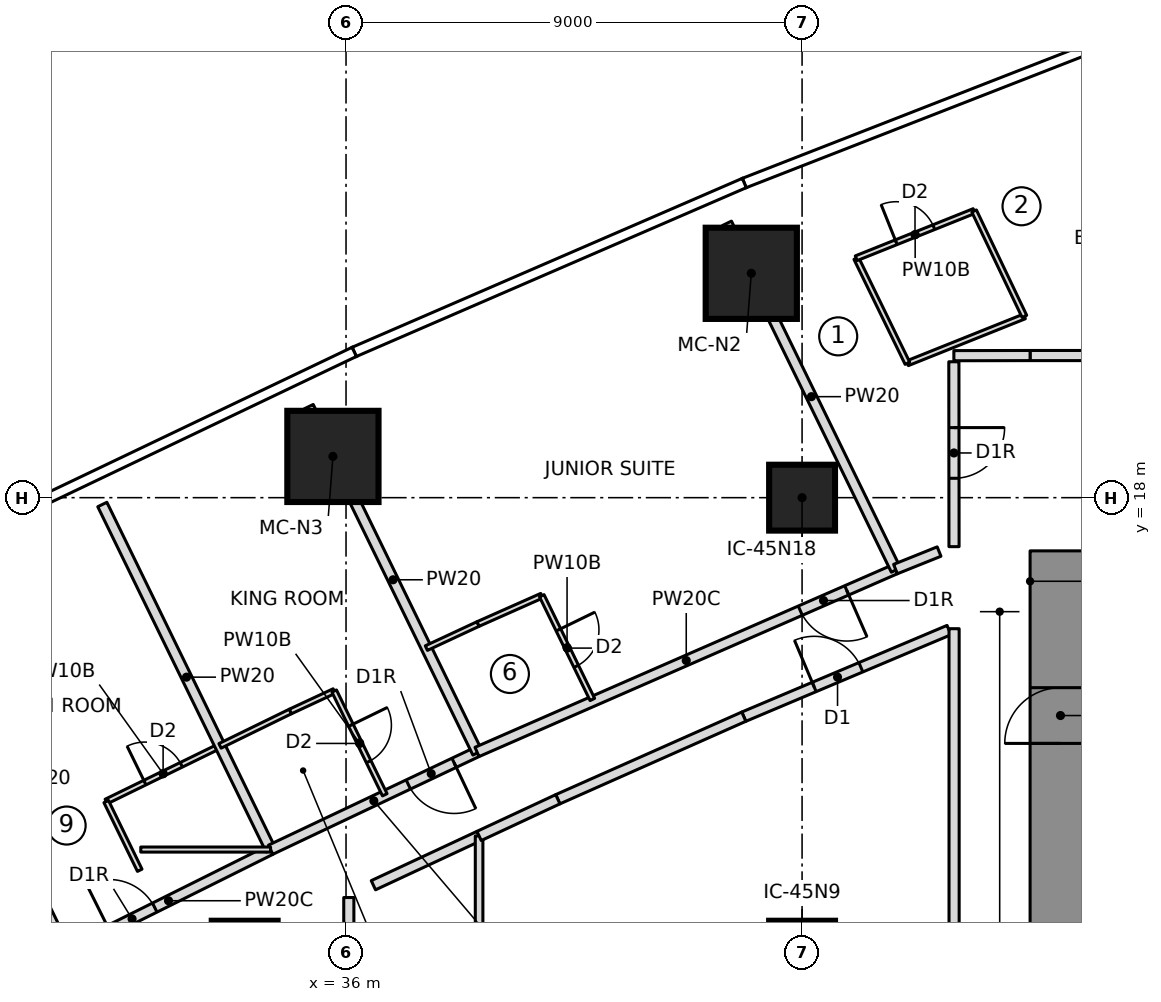
"""IFC4 building model, lengths in metres.
Left out: names, types, materials, properties, quantities, classifications, styles, units other than length and angle.
Written with IfcOpenShell. Run it as: python <this file> out.ifc"""

import sys

from ifc_helpers import new_model, si_unit, direction, frame, frame_2d, origin, origin_2d, place, context, subcontext, project, spatial, rectangle, extrude, element, fill, save


model = new_model("IFC4")
c1 = context("Model", 3, precision=1e-05, world=origin(), true_north=direction((0.0, 1.0)))
c2 = subcontext(c1, "Body", "Model", "MODEL_VIEW")
j1 = project(units=[si_unit("LENGTHUNIT", "METRE"), si_unit("PLANEANGLEUNIT", "RADIAN")], contexts=[c1])
p1 = place(None, origin())
s1 = spatial("IfcSite", under=j1, at=p1, CompositionType="ELEMENT")
p2 = place(p1, origin())
s2 = spatial("IfcBuilding", under=s1, at=p2, CompositionType="ELEMENT")
p3 = place(p2, frame((0.0, 0.0, 39.6)))
s3 = spatial("IfcBuildingStorey", under=s2, at=p3, CompositionType="ELEMENT", Elevation=39.6)
p4 = place(p3, frame((50.1, 6.65, 0.0), z_axis=(0.0, 0.0, 1.0), x_axis=(0.0, 1.0, 0.0)))
e1 = element("IfcWall", 1, at=p4, inside=s3, PredefinedType="SHEAR", context=c2, shape_type="SweptSolid", body=[
    extrude(rectangle(XDim=10.3, YDim=1.2, at=frame_2d((5.15, 0.0))), origin(), (0.0, 0.0, 1.0), 3.55),
])
p5 = place(p4, frame((6.5, 0.0, 0.0)))
e2 = element("IfcOpeningElement", 2, at=p5, cuts=e1, PredefinedType="OPENING", context=c2, shape_type="SweptSolid", body=[
    extrude(rectangle(XDim=1.1, YDim=2.1, at=frame_2d((0.55, 1.05))), frame((0.0, 0.61, 0.0), z_axis=(0.0, -1.0, 0.0), x_axis=(1.0, 0.0, 0.0)), (0.0, 0.0, 1.0), 1.22),
])
for number, where, z_axis, x_axis in (
    (3, (43.998, 22.428, 0.0), (0.0, 0.0, 1.0), (1.0, 0.0, 0.0)),
    (4, (35.741, 18.814, 0.0), (0.0, 0.0, 1.0), (1.0, 0.0, 0.0)),
):
    element("IfcColumn", number, at=place(p3, frame(where, z_axis=z_axis, x_axis=x_axis)), inside=s3, PredefinedType="COLUMN", context=c2, shape_type="SweptSolid", body=[
        extrude(rectangle(XDim=1.8, YDim=1.8, at=origin_2d()), origin(), (0.0, 0.0, 1.0), 3.55),
    ])
for number, where, z_axis, x_axis in (
    (5, (34.0, 9.0, 0.0), (0.0, 0.0, 1.0), (1.0, 0.0, 0.0)),
    (6, (45.0, 9.0, 0.0), (0.0, 0.0, 1.0), (1.0, 0.0, 0.0)),
    (7, (45.0, 18.0, 0.0), (0.0, 0.0, 1.0), (1.0, 0.0, 0.0)),
):
    element("IfcColumn", number, at=place(p3, frame(where, z_axis=z_axis, x_axis=x_axis)), inside=s3, PredefinedType="COLUMN", context=c2, shape_type="SweptSolid", body=[
        extrude(rectangle(XDim=1.3, YDim=1.3, at=origin_2d()), origin(), (0.0, 0.0, 1.0), 3.55),
    ])
p6 = place(p3, frame((30.489, 9.022, 0.0), z_axis=(0.0, 0.0, 1.0), x_axis=(-0.43822365664, 0.898865967072, 0.0)))
e8 = element("IfcWall", 8, at=p6, inside=s3, PredefinedType="PARTITIONING", context=c2, shape_type="SweptSolid", body=[
    extrude(rectangle(XDim=7.601, YDim=0.2, at=frame_2d((3.801, 0.0))), origin(), (0.0, 0.0, 1.0), 3.25),
])
p7 = place(p3, frame((30.48, 9.04, 0.0), z_axis=(0.0, 0.0, 1.0), x_axis=(0.894989913054, 0.446086376761, 0.0)))
e9 = element("IfcWall", 9, at=p7, inside=s3, PredefinedType="PARTITIONING", context=c2, shape_type="SweptSolid", body=[
    extrude(rectangle(XDim=4.506, YDim=0.2, at=frame_2d((2.253, 0.0))), origin(), (0.0, 0.0, 1.0), 3.25),
])
p8 = place(p7, frame((0.95, 0.0, 0.0)))
e10 = element("IfcOpeningElement", 10, at=p8, cuts=e9, PredefinedType="OPENING", context=c2, shape_type="SweptSolid", body=[
    extrude(rectangle(XDim=1.0, YDim=2.1, at=frame_2d((0.5, 1.05))), frame((0.0, 0.11, 0.0), z_axis=(0.0, -1.0, 0.0), x_axis=(1.0, 0.0, 0.0)), (0.0, 0.0, 1.0), 0.22),
])
p9 = place(p3, frame((31.267, 12.003, 0.0), z_axis=(0.0, 0.0, 1.0), x_axis=(0.89845285455, 0.439070003702, 0.0)))
e11 = element("IfcWall", 11, at=p9, inside=s3, PredefinedType="PARTITIONING", context=c2, shape_type="SweptSolid", body=[
    extrude(rectangle(XDim=2.5, YDim=0.1, at=frame_2d((1.25, 0.0))), origin(), (0.0, 0.0, 1.0), 3.25),
])
p10 = place(p9, frame((0.85, 0.0, 0.0)))
e12 = element("IfcOpeningElement", 12, at=p10, cuts=e11, PredefinedType="OPENING", context=c2, shape_type="SweptSolid", body=[
    extrude(rectangle(XDim=0.8, YDim=2.1, at=frame_2d((0.4, 1.05))), frame((0.0, 0.06, 0.0), z_axis=(0.0, -1.0, 0.0), x_axis=(1.0, 0.0, 0.0)), (0.0, 0.0, 1.0), 0.12),
])
p11 = place(p3, frame((31.929, 10.646, 0.0), z_axis=(0.0, 0.0, 1.0), x_axis=(-0.438136931394, 0.898908243008, 0.0)))
e13 = element("IfcWall", 13, at=p11, inside=s3, PredefinedType="PARTITIONING", context=c2, shape_type="SweptSolid", body=[
    extrude(rectangle(XDim=1.51, YDim=0.1, at=frame_2d((0.755, 0.0))), origin(), (0.0, 0.0, 1.0), 3.25),
])
p12 = place(p3, frame((34.513, 11.05, 0.0), z_axis=(0.0, 0.0, 1.0), x_axis=(-0.438187612283, 0.898883538865, 0.0)))
e14 = element("IfcWall", 14, at=p12, inside=s3, PredefinedType="PARTITIONING", context=c2, shape_type="SweptSolid", body=[
    extrude(rectangle(XDim=7.582, YDim=0.2, at=frame_2d((3.791, 0.0))), origin(), (0.0, 0.0, 1.0), 3.25),
])
p13 = place(p3, frame((38.585, 12.981, 0.0), z_axis=(0.0, 0.0, 1.0), x_axis=(-0.903706948966, -0.428151550727, 0.0)))
e15 = element("IfcWall", 15, at=p13, inside=s3, PredefinedType="PARTITIONING", context=c2, shape_type="SweptSolid", body=[
    extrude(rectangle(XDim=4.506, YDim=0.2, at=frame_2d((2.253, 0.0))), origin(), (0.0, 0.0, 1.0), 3.25),
])
p14 = place(p13, frame((0.5, 0.0, 0.0)))
e16 = element("IfcOpeningElement", 16, at=p14, cuts=e15, PredefinedType="OPENING", context=c2, shape_type="SweptSolid", body=[
    extrude(rectangle(XDim=1.0, YDim=2.1, at=frame_2d((0.5, 1.05))), frame((0.0, 0.11, 0.0), z_axis=(0.0, -1.0, 0.0), x_axis=(1.0, 0.0, 0.0)), (0.0, 0.0, 1.0), 0.22),
])
p15 = place(p3, frame((33.513, 13.101, 0.0), z_axis=(0.0, 0.0, 1.0), x_axis=(0.898338680123, 0.439303557685, 0.0)))
e17 = element("IfcWall", 17, at=p15, inside=s3, PredefinedType="PARTITIONING", context=c2, shape_type="SweptSolid", body=[
    extrude(rectangle(XDim=1.547, YDim=0.1, at=frame_2d((0.773, 0.0))), origin(), (0.0, 0.0, 1.0), 3.25),
])
p16 = place(p3, frame((34.903, 13.781, 0.0), z_axis=(0.0, 0.0, 1.0), x_axis=(0.906477304063, 0.422254540791, 0.0)))
e18 = element("IfcWall", 18, at=p16, inside=s3, PredefinedType="PARTITIONING", context=c2, shape_type="SweptSolid", body=[
    extrude(rectangle(XDim=0.953, YDim=0.1, at=frame_2d((0.477, 0.0))), origin(), (0.0, 0.0, 1.0), 3.25),
])
p17 = place(p3, frame((35.767, 14.183, 0.0), z_axis=(0.0, 0.0, 1.0), x_axis=(0.438229314017, -0.898863208912, 0.0)))
e19 = element("IfcWall", 19, at=p17, inside=s3, PredefinedType="PARTITIONING", context=c2, shape_type="SweptSolid", body=[
    extrude(rectangle(XDim=2.277, YDim=0.1, at=frame_2d((1.139, 0.0))), origin(), (0.0, 0.0, 1.0), 3.25),
])
p18 = place(p17, frame((0.75, 0.0, 0.0)))
e20 = element("IfcOpeningElement", 20, at=p18, cuts=e19, PredefinedType="OPENING", context=c2, shape_type="SweptSolid", body=[
    extrude(rectangle(XDim=0.8, YDim=2.1, at=frame_2d((0.4, 1.05))), frame((0.0, 0.06, 0.0), z_axis=(0.0, -1.0, 0.0), x_axis=(1.0, 0.0, 0.0)), (0.0, 0.0, 1.0), 0.12),
])
p19 = place(p3, frame((38.594, 12.963, 0.0), z_axis=(0.0, 0.0, 1.0), x_axis=(-0.438197705697, 0.898878618459, 0.0)))
e21 = element("IfcWall", 21, at=p19, inside=s3, PredefinedType="PARTITIONING", context=c2, shape_type="SweptSolid", body=[
    extrude(rectangle(XDim=7.601, YDim=0.2, at=frame_2d((3.801, 0.0))), origin(), (0.0, 0.0, 1.0), 3.25),
])
p20 = place(p3, frame((46.844, 16.591, 0.0), z_axis=(0.0, 0.0, 1.0), x_axis=(-0.916303988169, -0.400483459415, 0.0)))
e22 = element("IfcWall", 22, at=p20, inside=s3, PredefinedType="PARTITIONING", context=c2, shape_type="SweptSolid", body=[
    extrude(rectangle(XDim=9.013, YDim=0.2, at=frame_2d((4.507, 0.0))), origin(), (0.0, 0.0, 1.0), 3.25),
])
p21 = place(p20, frame((1.05, 0.0, 0.0)))
e23 = element("IfcOpeningElement", 23, at=p21, cuts=e22, PredefinedType="OPENING", context=c2, shape_type="SweptSolid", body=[
    extrude(rectangle(XDim=1.0, YDim=2.1, at=frame_2d((0.5, 1.05))), frame((0.0, 0.11, 0.0), z_axis=(0.0, -1.0, 0.0), x_axis=(1.0, 0.0, 0.0)), (0.0, 0.0, 1.0), 0.22),
])
p22 = place(p3, frame((37.586, 15.031, 0.0), z_axis=(0.0, 0.0, 1.0), x_axis=(0.90632717857, 0.422576673972, 0.0)))
e24 = element("IfcWall", 24, at=p22, inside=s3, PredefinedType="PARTITIONING", context=c2, shape_type="SweptSolid", body=[
    extrude(rectangle(XDim=1.125, YDim=0.1, at=frame_2d((0.563, 0.0))), origin(), (0.0, 0.0, 1.0), 3.25),
])
p23 = place(p3, frame((38.606, 15.507, 0.0), z_axis=(0.0, 0.0, 1.0), x_axis=(0.913972512123, 0.405776104625, 0.0)))
e25 = element("IfcWall", 25, at=p23, inside=s3, PredefinedType="PARTITIONING", context=c2, shape_type="SweptSolid", body=[
    extrude(rectangle(XDim=1.375, YDim=0.1, at=frame_2d((0.688, 0.0))), origin(), (0.0, 0.0, 1.0), 3.25),
])
p24 = place(p3, frame((39.863, 16.065, 0.0), z_axis=(0.0, 0.0, 1.0), x_axis=(0.438233629628, -0.898861104878, 0.0)))
e26 = element("IfcWall", 26, at=p24, inside=s3, PredefinedType="PARTITIONING", context=c2, shape_type="SweptSolid", body=[
    extrude(rectangle(XDim=2.279, YDim=0.1, at=frame_2d((1.139, 0.0))), origin(), (0.0, 0.0, 1.0), 3.25),
])
p25 = place(p24, frame((0.75, 0.0, 0.0)))
e27 = element("IfcOpeningElement", 27, at=p25, cuts=e26, PredefinedType="OPENING", context=c2, shape_type="SweptSolid", body=[
    extrude(rectangle(XDim=0.8, YDim=2.1, at=frame_2d((0.4, 1.05))), frame((0.0, 0.06, 0.0), z_axis=(0.0, -1.0, 0.0), x_axis=(1.0, 0.0, 0.0)), (0.0, 0.0, 1.0), 0.12),
])
p26 = place(p3, frame((46.852, 16.573, 0.0), z_axis=(0.0, 0.0, 1.0), x_axis=(-0.438196739796, 0.898879089328, 0.0)))
e28 = element("IfcWall", 28, at=p26, inside=s3, PredefinedType="PARTITIONING", context=c2, shape_type="SweptSolid", body=[
    extrude(rectangle(XDim=7.611, YDim=0.2, at=frame_2d((3.806, 0.0))), origin(), (0.0, 0.0, 1.0), 3.25),
])
p27 = place(p3, frame((49.388, 21.577, 0.0), z_axis=(0.0, 0.0, 1.0), x_axis=(-0.928266690687, -0.371915247014, 0.0)))
e29 = element("IfcWall", 29, at=p27, inside=s3, PredefinedType="PARTITIONING", context=c2, shape_type="SweptSolid", body=[
    extrude(rectangle(XDim=2.487, YDim=0.1, at=frame_2d((1.244, 0.0))), origin(), (0.0, 0.0, 1.0), 3.25),
])
p28 = place(p3, frame((47.079, 20.652, 0.0), z_axis=(0.0, 0.0, 1.0), x_axis=(-0.438171240168, 0.898891519756, 0.0)))
e30 = element("IfcWall", 30, at=p28, inside=s3, PredefinedType="PARTITIONING", context=c2, shape_type="SweptSolid", body=[
    extrude(rectangle(XDim=2.306, YDim=0.1, at=frame_2d((1.153, 0.0))), origin(), (0.0, 0.0, 1.0), 3.25),
])
p29 = place(p3, frame((46.069, 22.725, 0.0), z_axis=(0.0, 0.0, 1.0), x_axis=(0.928288495333, 0.371860819975, 0.0)))
e31 = element("IfcWall", 31, at=p29, inside=s3, PredefinedType="PARTITIONING", context=c2, shape_type="SweptSolid", body=[
    extrude(rectangle(XDim=2.507, YDim=0.1, at=frame_2d((1.253, 0.0))), origin(), (0.0, 0.0, 1.0), 3.25),
])
p30 = place(p29, frame((0.85, 0.0, 0.0)))
e32 = element("IfcOpeningElement", 32, at=p30, cuts=e31, PredefinedType="OPENING", context=c2, shape_type="SweptSolid", body=[
    extrude(rectangle(XDim=0.8, YDim=2.1, at=frame_2d((0.4, 1.05))), frame((0.0, 0.06, 0.0), z_axis=(0.0, -1.0, 0.0), x_axis=(1.0, 0.0, 0.0)), (0.0, 0.0, 1.0), 0.12),
])
p31 = place(p3, frame((36.54, 10.351, 0.0), z_axis=(0.0, 0.0, 1.0), x_axis=(0.906372737018, 0.422478948103, 0.0)))
e33 = element("IfcWall", 33, at=p31, inside=s3, PredefinedType="PARTITIONING", context=c2, shape_type="SweptSolid", body=[
    extrude(rectangle(XDim=2.302, YDim=0.2, at=frame_2d((1.151, 0.0))), origin(), (0.0, 0.0, 1.0), 3.25),
])
p32 = place(p3, frame((38.626, -11.323, 0.0), z_axis=(0.0, 0.0, 1.0), x_axis=(0.0, 1.0, 0.0)))
e34 = element("IfcWall", 34, at=p32, inside=s3, PredefinedType="PARTITIONING", context=c2, shape_type="SweptSolid", body=[
    extrude(rectangle(XDim=22.647, YDim=0.15, at=frame_2d((11.323, 0.0))), origin(), (0.0, 0.0, 1.0), 3.25),
])
p33 = place(p3, frame((43.85, 13.677, 0.0), z_axis=(0.0, 0.0, 1.0), x_axis=(0.921265924084, 0.388933281068, 0.0)))
e35 = element("IfcWall", 35, at=p33, inside=s3, PredefinedType="PARTITIONING", context=c2, shape_type="SweptSolid", body=[
    extrude(rectangle(XDim=4.396, YDim=0.2, at=frame_2d((2.198, 0.0))), origin(), (0.0, 0.0, 1.0), 3.25),
])
p34 = place(p33, frame((1.508, 0.0, 0.0)))
e36 = element("IfcOpeningElement", 36, at=p34, cuts=e35, PredefinedType="OPENING", context=c2, shape_type="SweptSolid", body=[
    extrude(rectangle(XDim=1.0, YDim=2.1, at=frame_2d((0.5, 1.05))), frame((0.0, 0.11, 0.0), z_axis=(0.0, -1.0, 0.0), x_axis=(1.0, 0.0, 0.0)), (0.0, 0.0, 1.0), 0.22),
])
p35 = place(p3, frame((40.18, 12.048, 0.0), z_axis=(0.0, 0.0, 1.0), x_axis=(0.913986953061, 0.405743576209, 0.0)))
e37 = element("IfcWall", 37, at=p35, inside=s3, PredefinedType="PARTITIONING", context=c2, shape_type="SweptSolid", body=[
    extrude(rectangle(XDim=4.016, YDim=0.2, at=frame_2d((2.008, 0.0))), origin(), (0.0, 0.0, 1.0), 3.25),
])
p36 = place(p3, frame((38.626, 11.323, 0.0), z_axis=(0.0, 0.0, 1.0), x_axis=(0.906314095157, 0.422604733668, 0.0)))
e38 = element("IfcWall", 38, at=p36, inside=s3, PredefinedType="PARTITIONING", context=c2, shape_type="SweptSolid", body=[
    extrude(rectangle(XDim=1.714, YDim=0.2, at=frame_2d((0.857, 0.0))), origin(), (0.0, 0.0, 1.0), 3.25),
])
p37 = place(p3, frame((54.597, 20.805, 0.0), z_axis=(0.0, 0.0, 1.0), x_axis=(-1.0, 0.0, 0.0)))
e39 = element("IfcWall", 39, at=p37, inside=s3, PredefinedType="PARTITIONING", context=c2, shape_type="SweptSolid", body=[
    extrude(rectangle(XDim=5.097, YDim=0.2, at=frame_2d((2.548, 0.0))), origin(), (0.0, 0.0, 1.0), 3.25),
])
p38 = place(p37, frame((2.048, 0.0, 0.0)))
e40 = element("IfcOpeningElement", 40, at=p38, cuts=e39, PredefinedType="OPENING", context=c2, shape_type="SweptSolid", body=[
    extrude(rectangle(XDim=1.5, YDim=2.1, at=frame_2d((0.75, 1.05))), frame((0.0, 0.11, 0.0), z_axis=(0.0, -1.0, 0.0), x_axis=(1.0, 0.0, 0.0)), (0.0, 0.0, 1.0), 0.22),
])
p39 = place(p3, frame((34.51, 11.055, 0.0), z_axis=(0.0, 0.0, 1.0), x_axis=(-1.0, 0.0, 0.0)))
e41 = element("IfcWall", 41, at=p39, inside=s3, PredefinedType="PARTITIONING", context=c2, shape_type="SweptSolid", body=[
    extrude(rectangle(XDim=2.562, YDim=0.1, at=frame_2d((1.281, 0.0))), origin(), (0.0, 0.0, 1.0), 3.25),
])
p40 = place(p3, frame((48.396, 23.657, 0.0), z_axis=(0.0, 0.0, 1.0), x_axis=(0.4306119303, -0.902537182327, 0.0)))
e42 = element("IfcWall", 42, at=p40, inside=s3, PredefinedType="PARTITIONING", context=c2, shape_type="SweptSolid", body=[
    extrude(rectangle(XDim=2.305, YDim=0.1, at=frame_2d((1.152, 0.0))), origin(), (0.0, 0.0, 1.0), 3.25),
])
p41 = place(p3, frame((47.704, 16.936, 0.0), z_axis=(0.0, 0.0, 1.0), x_axis=(-0.927985537407, -0.372616213232, 0.0)))
e43 = element("IfcWall", 43, at=p41, inside=s3, PredefinedType="PARTITIONING", context=c2, shape_type="SweptSolid", body=[
    extrude(rectangle(XDim=0.927, YDim=0.2, at=frame_2d((0.463, 0.0))), origin(), (0.0, 0.0, 1.0), 3.25),
])
p42 = place(p3, frame((36.055, 6.949, 0.0), z_axis=(0.0, 0.0, 1.0), x_axis=(0.0, 1.0, 0.0)))
e44 = element("IfcWall", 44, at=p42, inside=s3, PredefinedType="PARTITIONING", context=c2, shape_type="SweptSolid", body=[
    extrude(rectangle(XDim=3.159, YDim=0.2, at=frame_2d((1.58, 0.0))), origin(), (0.0, 0.0, 1.0), 3.25),
])
p43 = place(p3, frame((48.0, 15.414, 0.0), z_axis=(0.0, 0.0, 1.0), x_axis=(0.0, -1.0, 0.0)))
e45 = element("IfcWall", 45, at=p43, inside=s3, PredefinedType="PARTITIONING", context=c2, shape_type="SweptSolid", body=[
    extrude(rectangle(XDim=30.828, YDim=0.2, at=frame_2d((15.414, 0.0))), origin(), (0.0, 0.0, 1.0), 3.25),
])
p44 = place(p3, frame((49.5, 20.805, 0.0), z_axis=(0.0, 0.0, 1.0), x_axis=(-0.999998683182, -0.001622847587, 0.0)))
e46 = element("IfcWall", 46, at=p44, inside=s3, PredefinedType="PARTITIONING", context=c2, shape_type="SweptSolid", body=[
    extrude(rectangle(XDim=1.504, YDim=0.2, at=frame_2d((0.752, 0.0))), origin(), (0.0, 0.0, 1.0), 3.25),
])
p45 = place(p3, frame((47.996, 20.682, 0.0), z_axis=(0.0, 0.0, 1.0), x_axis=(0.000869739418, -0.999999621777, 0.0)))
e47 = element("IfcWall", 47, at=p45, inside=s3, PredefinedType="PARTITIONING", context=c2, shape_type="SweptSolid", body=[
    extrude(rectangle(XDim=3.649, YDim=0.2, at=frame_2d((1.825, 0.0))), origin(), (0.0, 0.0, 1.0), 3.25),
])
p46 = place(p45, frame((1.3, 0.0, 0.0)))
e48 = element("IfcOpeningElement", 48, at=p46, cuts=e47, PredefinedType="OPENING", context=c2, shape_type="SweptSolid", body=[
    extrude(rectangle(XDim=1.0, YDim=2.1, at=frame_2d((0.5, 1.05))), frame((0.0, 0.11, 0.0), z_axis=(0.0, -1.0, 0.0), x_axis=(1.0, 0.0, 0.0)), (0.0, 0.0, 1.0), 0.22),
])
p47 = place(p10, origin())
e49 = element("IfcDoor", 49, at=p47, inside=s3, OperationType="SINGLE_SWING_LEFT", PredefinedType="DOOR", context=c2, shape_type="SweptSolid", body=[
    extrude(rectangle(XDim=0.8, YDim=2.1, at=frame_2d((0.4, 1.05))), frame((0.0, 0.025, 0.0), z_axis=(0.0, -1.0, 0.0), x_axis=(1.0, 0.0, 0.0)), (0.0, 0.0, 1.0), 0.05),
])
fill(e12, e49)
p48 = place(p8, origin())
e50 = element("IfcDoor", 50, at=p48, inside=s3, OperationType="SINGLE_SWING_RIGHT", PredefinedType="DOOR", context=c2, shape_type="SweptSolid", body=[
    extrude(rectangle(XDim=1.0, YDim=2.1, at=frame_2d((0.5, 1.05))), frame((0.0, 0.025, 0.0), z_axis=(0.0, -1.0, 0.0), x_axis=(1.0, 0.0, 0.0)), (0.0, 0.0, 1.0), 0.05),
])
fill(e10, e50)
p49 = place(p18, origin())
e51 = element("IfcDoor", 51, at=p49, inside=s3, OperationType="SINGLE_SWING_LEFT", PredefinedType="DOOR", context=c2, shape_type="SweptSolid", body=[
    extrude(rectangle(XDim=0.8, YDim=2.1, at=frame_2d((0.4, 1.05))), frame((0.0, 0.025, 0.0), z_axis=(0.0, -1.0, 0.0), x_axis=(1.0, 0.0, 0.0)), (0.0, 0.0, 1.0), 0.05),
])
fill(e20, e51)
p50 = place(p14, origin())
e52 = element("IfcDoor", 52, at=p50, inside=s3, OperationType="SINGLE_SWING_RIGHT", PredefinedType="DOOR", context=c2, shape_type="SweptSolid", body=[
    extrude(rectangle(XDim=1.0, YDim=2.1, at=frame_2d((0.5, 1.05))), frame((0.0, 0.025, 0.0), z_axis=(0.0, -1.0, 0.0), x_axis=(1.0, 0.0, 0.0)), (0.0, 0.0, 1.0), 0.05),
])
fill(e16, e52)
p51 = place(p25, origin())
e53 = element("IfcDoor", 53, at=p51, inside=s3, OperationType="SINGLE_SWING_LEFT", PredefinedType="DOOR", context=c2, shape_type="SweptSolid", body=[
    extrude(rectangle(XDim=0.8, YDim=2.1, at=frame_2d((0.4, 1.05))), frame((0.0, 0.025, 0.0), z_axis=(0.0, -1.0, 0.0), x_axis=(1.0, 0.0, 0.0)), (0.0, 0.0, 1.0), 0.05),
])
fill(e27, e53)
p52 = place(p21, origin())
e54 = element("IfcDoor", 54, at=p52, inside=s3, OperationType="SINGLE_SWING_RIGHT", PredefinedType="DOOR", context=c2, shape_type="SweptSolid", body=[
    extrude(rectangle(XDim=1.0, YDim=2.1, at=frame_2d((0.5, 1.05))), frame((0.0, 0.025, 0.0), z_axis=(0.0, -1.0, 0.0), x_axis=(1.0, 0.0, 0.0)), (0.0, 0.0, 1.0), 0.05),
])
fill(e23, e54)
p53 = place(p30, origin())
e55 = element("IfcDoor", 55, at=p53, inside=s3, OperationType="SINGLE_SWING_LEFT", PredefinedType="DOOR", context=c2, shape_type="SweptSolid", body=[
    extrude(rectangle(XDim=0.8, YDim=2.1, at=frame_2d((0.4, 1.05))), frame((0.0, 0.025, 0.0), z_axis=(0.0, -1.0, 0.0), x_axis=(1.0, 0.0, 0.0)), (0.0, 0.0, 1.0), 0.05),
])
fill(e32, e55)
p54 = place(p34, origin())
e56 = element("IfcDoor", 56, at=p54, inside=s3, OperationType="SINGLE_SWING_LEFT", PredefinedType="DOOR", context=c2, shape_type="SweptSolid", body=[
    extrude(rectangle(XDim=1.0, YDim=2.1, at=frame_2d((0.5, 1.05))), frame((0.0, 0.025, 0.0), z_axis=(0.0, -1.0, 0.0), x_axis=(1.0, 0.0, 0.0)), (0.0, 0.0, 1.0), 0.05),
])
fill(e36, e56)
p55 = place(p46, origin())
e57 = element("IfcDoor", 57, at=p55, inside=s3, OperationType="SINGLE_SWING_RIGHT", PredefinedType="DOOR", context=c2, shape_type="SweptSolid", body=[
    extrude(rectangle(XDim=1.0, YDim=2.1, at=frame_2d((0.5, 1.05))), frame((0.0, 0.025, 0.0), z_axis=(0.0, -1.0, 0.0), x_axis=(1.0, 0.0, 0.0)), (0.0, 0.0, 1.0), 0.05),
])
fill(e48, e57)
p56 = place(p5, origin())
e58 = element("IfcDoor", 58, at=p56, inside=s3, OperationType="SINGLE_SWING_RIGHT", PredefinedType="DOOR", context=c2, shape_type="SweptSolid", body=[
    extrude(rectangle(XDim=1.1, YDim=2.1, at=frame_2d((0.55, 1.05))), frame((0.0, 0.025, 0.0), z_axis=(0.0, -1.0, 0.0), x_axis=(1.0, 0.0, 0.0)), (0.0, 0.0, 1.0), 0.05),
])
fill(e2, e58)
save(model, sys.argv[1])
